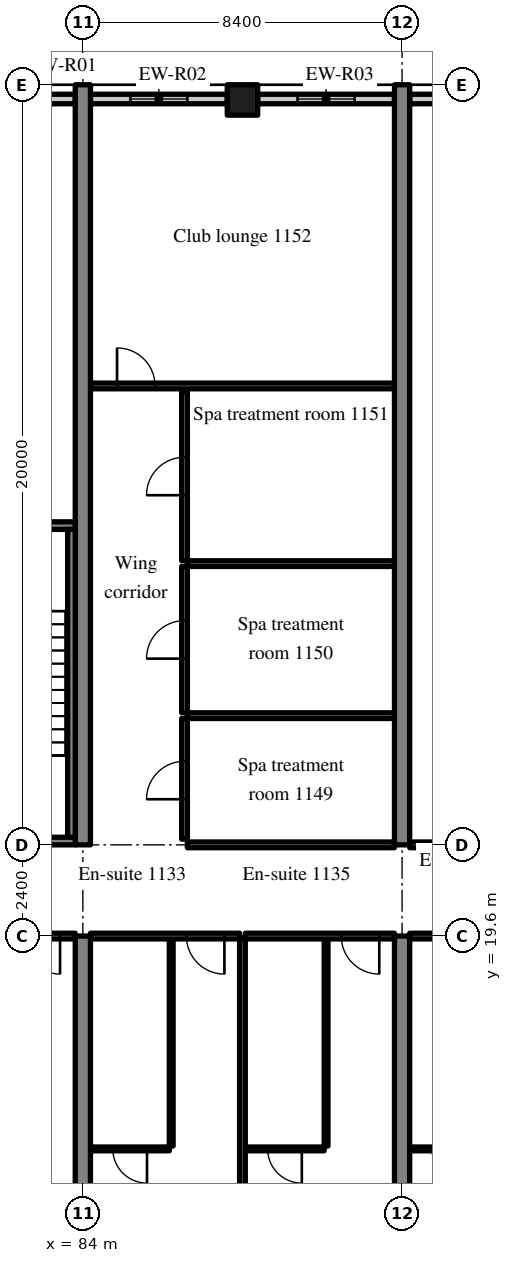
"""IFC4 building model, lengths in metres.
Left out: names, types, materials, properties, quantities, classifications, styles, units other than length and angle.
Written with IfcOpenShell. Run it as: python <this file> out.ifc"""

import sys

from ifc_helpers import new_model, si_unit, direction, frame, frame_2d, origin, origin_2d, place, context, subcontext, project, spatial, rectangle, extrude, source, transform, mapped, element, fill, save


model = new_model("IFC4")
c1 = context("Model", 3, precision=1e-05, world=origin(), true_north=direction((0.0, 1.0)))
c2 = subcontext(c1, "Body", "Model", "MODEL_VIEW")
j1 = project(units=[si_unit("LENGTHUNIT", "METRE"), si_unit("PLANEANGLEUNIT", "RADIAN")], contexts=[c1])
p1 = place(None, origin())
s1 = spatial("IfcSite", under=j1, at=p1, CompositionType="ELEMENT")
p2 = place(p1, origin())
s2 = spatial("IfcBuilding", under=s1, at=p2, CompositionType="ELEMENT")
p3 = place(p2, frame((0.0, 0.0, 50.6)))
s3 = spatial("IfcBuildingStorey", under=s2, at=p3, CompositionType="ELEMENT", Elevation=50.6)
m1 = source(origin(), c2, "Body", "SweptSolid", [
    extrude(rectangle(XDim=19.6, YDim=0.4, at=frame_2d((9.8, 0.0))), origin(), (0.0, 0.0, 1.0), 3.52),
])
p4 = place(p3, frame((84.0, 0.0, 0.0), z_axis=(0.0, 0.0, 1.0), x_axis=(0.0, 1.0, 0.0)))
e1 = element("IfcWall", 1, at=p4, inside=s3, PredefinedType="SHEAR", context=c2, shape_type="MappedRepresentation", body=[
    mapped(m1, transform((0.0, 0.0, 0.0), scale=1.0)),
])
m2 = source(origin(), c2, "Body", "SweptSolid", [
    extrude(rectangle(XDim=20.0, YDim=0.4, at=frame_2d((10.0, 0.0))), origin(), (0.0, 0.0, 1.0), 3.52),
])
p5 = place(p3, frame((84.0, 22.0, 0.0), z_axis=(0.0, 0.0, 1.0), x_axis=(0.0, 1.0, 0.0)))
e2 = element("IfcWall", 2, at=p5, inside=s3, PredefinedType="SHEAR", context=c2, shape_type="MappedRepresentation", body=[
    mapped(m2, transform((0.0, 0.0, 0.0), scale=1.0)),
])
p6 = place(p3, frame((92.4, 0.0, 0.0), z_axis=(0.0, 0.0, 1.0), x_axis=(0.0, 1.0, 0.0)))
e3 = element("IfcWall", 3, at=p6, inside=s3, PredefinedType="SHEAR", context=c2, shape_type="MappedRepresentation", body=[
    mapped(m1, transform((0.0, 0.0, 0.0), scale=1.0)),
])
p7 = place(p3, frame((92.4, 22.0, 0.0), z_axis=(0.0, 0.0, 1.0), x_axis=(0.0, 1.0, 0.0)))
e4 = element("IfcWall", 4, at=p7, inside=s3, PredefinedType="SHEAR", context=c2, shape_type="MappedRepresentation", body=[
    mapped(m2, transform((0.0, 0.0, 0.0), scale=1.0)),
])
m3 = source(origin(), c2, "Body", "SweptSolid", [
    extrude(rectangle(XDim=0.8, YDim=0.8, at=origin_2d()), origin(), (0.0, 0.0, 1.0), 3.52),
])
p8 = place(p3, frame((88.2, 41.6, 0.0), z_axis=(0.0, 0.0, 1.0), x_axis=(1.0, 0.0, 0.0)))
e5 = element("IfcColumn", 5, at=p8, inside=s3, PredefinedType="COLUMN", context=c2, shape_type="MappedRepresentation", body=[
    mapped(m3, transform((0.0, 0.0, 0.0), scale=1.0)),
])
m4 = source(origin(), c2, "Body", "SweptSolid", [
    extrude(rectangle(XDim=1.658, YDim=0.25, at=frame_2d((0.829, 0.0))), origin(), (0.0, 0.0, 1.0), 2.82),
])
p9 = place(p3, frame((83.8, 41.625, 0.0), z_axis=(0.0, 0.0, 1.0), x_axis=(-1.0, 0.0, 0.0)))
e6 = element("IfcWall", 6, at=p9, inside=s3, PredefinedType="SOLIDWALL", context=c2, shape_type="MappedRepresentation", body=[
    mapped(m4, transform((0.0, 0.0, 0.0), scale=1.0)),
])
m5 = source(origin(), c2, "Body", "SweptSolid", [
    extrude(rectangle(XDim=3.6, YDim=0.25, at=frame_2d((1.8, 0.0))), origin(), (0.0, 0.0, 1.0), 2.82),
])
p10 = place(p3, frame((87.8, 41.625, 0.0), z_axis=(0.0, 0.0, 1.0), x_axis=(-1.0, 0.0, 0.0)))
e7 = element("IfcWall", 7, at=p10, inside=s3, PredefinedType="SOLIDWALL", context=c2, shape_type="MappedRepresentation", body=[
    mapped(m5, transform((0.0, 0.0, 0.0), scale=1.0)),
])
m6 = source(origin(), c2, "Body", "SweptSolid", [
    extrude(rectangle(XDim=1.5, YDim=1.5, at=frame_2d((0.75, 0.75))), frame((0.0, 0.135, 0.0), z_axis=(0.0, -1.0, 0.0), x_axis=(1.0, 0.0, 0.0)), (0.0, 0.0, 1.0), 0.27),
])
p11 = place(p10, frame((1.05, 0.0, 0.9)))
e8 = element("IfcOpeningElement", 8, at=p11, cuts=e7, PredefinedType="OPENING", context=c2, shape_type="MappedRepresentation", body=[
    mapped(m6, transform((0.0, 0.0, 0.0), scale=1.0)),
])
m7 = source(origin(), c2, "Body", "SweptSolid", [
    extrude(rectangle(XDim=3.6, YDim=0.25, at=frame_2d((1.8, 0.0))), origin(), (0.0, 0.0, 1.0), 2.82),
])
p12 = place(p3, frame((92.2, 41.625, 0.0), z_axis=(0.0, 0.0, 1.0), x_axis=(-1.0, 0.0, 0.0)))
e9 = element("IfcWall", 9, at=p12, inside=s3, PredefinedType="SOLIDWALL", context=c2, shape_type="MappedRepresentation", body=[
    mapped(m7, transform((0.0, 0.0, 0.0), scale=1.0)),
])
p13 = place(p12, frame((1.05, 0.0, 0.9)))
e10 = element("IfcOpeningElement", 10, at=p13, cuts=e9, PredefinedType="OPENING", context=c2, shape_type="MappedRepresentation", body=[
    mapped(m6, transform((0.0, 0.0, 0.0), scale=1.0)),
])
m8 = source(origin(), c2, "Body", "SweptSolid", [
    extrude(rectangle(XDim=4.045, YDim=0.25, at=frame_2d((2.022, 0.0))), origin(), (0.0, 0.0, 1.0), 2.82),
])
p14 = place(p3, frame((96.645, 41.625, 0.0), z_axis=(0.0, 0.0, 1.0), x_axis=(-1.0, 0.0, 0.0)))
e11 = element("IfcWall", 11, at=p14, inside=s3, PredefinedType="SOLIDWALL", context=c2, shape_type="MappedRepresentation", body=[
    mapped(m8, transform((0.0, 0.0, 0.0), scale=1.0)),
])
p15 = place(p14, frame((1.272, 0.0, 0.9)))
e12 = element("IfcOpeningElement", 12, at=p15, cuts=e11, PredefinedType="OPENING", context=c2, shape_type="MappedRepresentation", body=[
    mapped(m6, transform((0.0, 0.0, 0.0), scale=1.0)),
])
m9 = source(origin(), c2, "Body", "SweptSolid", [
    extrude(rectangle(XDim=8.2, YDim=0.2, at=frame_2d((4.1, 0.0))), origin(), (0.0, 0.0, 1.0), 3.52),
])
p16 = place(p3, frame((83.8, 22.1, 0.0), z_axis=(0.0, 0.0, 1.0), x_axis=(-1.0, 0.0, 0.0)))
e13 = element("IfcWall", 13, at=p16, inside=s3, PredefinedType="SOLIDWALL", context=c2, shape_type="MappedRepresentation", body=[
    mapped(m9, transform((0.0, 0.0, 0.0), scale=1.0)),
])
m10 = source(origin(), c2, "Body", "SweptSolid", [
    extrude(rectangle(XDim=1.2, YDim=2.1, at=frame_2d((0.6, 1.05))), frame((0.0, 0.11, 0.0), z_axis=(0.0, -1.0, 0.0), x_axis=(1.0, 0.0, 0.0)), (0.0, 0.0, 1.0), 0.22),
])
p17 = place(p16, frame((6.0, 0.0, 0.0)))
e14 = element("IfcOpeningElement", 14, at=p17, cuts=e13, PredefinedType="OPENING", context=c2, shape_type="MappedRepresentation", body=[
    mapped(m10, transform((0.0, 0.0, 0.0), scale=1.0)),
])
p18 = place(p3, frame((83.8, 30.4, 0.0), z_axis=(0.0, 0.0, 1.0), x_axis=(-1.0, 0.0, 0.0)))
e15 = element("IfcWall", 15, at=p18, inside=s3, PredefinedType="SOLIDWALL", context=c2, shape_type="MappedRepresentation", body=[
    mapped(m9, transform((0.0, 0.0, 0.0), scale=1.0)),
])
m11 = source(origin(), c2, "Body", "SweptSolid", [
    extrude(rectangle(XDim=1.0, YDim=2.1, at=frame_2d((0.5, 1.05))), frame((0.0, 0.11, 0.0), z_axis=(0.0, -1.0, 0.0), x_axis=(1.0, 0.0, 0.0)), (0.0, 0.0, 1.0), 0.22),
])
p19 = place(p18, frame((6.1, 0.0, 0.0)))
e16 = element("IfcOpeningElement", 16, at=p19, cuts=e15, PredefinedType="OPENING", context=c2, shape_type="MappedRepresentation", body=[
    mapped(m11, transform((0.0, 0.0, 0.0), scale=1.0)),
])
m12 = source(origin(), c2, "Body", "SweptSolid", [
    extrude(rectangle(XDim=8.1, YDim=0.2, at=frame_2d((4.05, 0.0))), origin(), (0.0, 0.0, 1.0), 3.52),
])
p20 = place(p3, frame((83.7, 22.2, 0.0), z_axis=(0.0, 0.0, 1.0), x_axis=(0.0, 1.0, 0.0)))
e17 = element("IfcWall", 17, at=p20, inside=s3, PredefinedType="SOLIDWALL", context=c2, shape_type="MappedRepresentation", body=[
    mapped(m12, transform((0.0, 0.0, 0.0), scale=1.0)),
])
m13 = source(origin(), c2, "Body", "SweptSolid", [
    extrude(rectangle(XDim=3.925, YDim=0.15, at=frame_2d((1.962, 0.0))), origin(), (0.0, 0.0, 1.0), 2.82),
])
p21 = place(p3, frame((79.875, 19.6, 0.0), z_axis=(0.0, 0.0, 1.0), x_axis=(1.0, 0.0, 0.0)))
e18 = element("IfcWall", 18, at=p21, inside=s3, PredefinedType="PARTITIONING", context=c2, shape_type="MappedRepresentation", body=[
    mapped(m13, transform((0.0, 0.0, 0.0), scale=1.0)),
])
m14 = source(origin(), c2, "Body", "SweptSolid", [
    extrude(rectangle(XDim=1.0, YDim=2.1, at=frame_2d((0.5, 1.05))), frame((0.0, 0.085, 0.0), z_axis=(0.0, -1.0, 0.0), x_axis=(1.0, 0.0, 0.0)), (0.0, 0.0, 1.0), 0.17),
])
p22 = place(p21, frame((2.525, 0.0, 0.0)))
e19 = element("IfcOpeningElement", 19, at=p22, cuts=e18, PredefinedType="OPENING", context=c2, shape_type="MappedRepresentation", body=[
    mapped(m14, transform((0.0, 0.0, 0.0), scale=1.0)),
])
m15 = source(origin(), c2, "Body", "SweptSolid", [
    extrude(rectangle(XDim=5.45, YDim=0.1, at=frame_2d((2.725, 0.0))), origin(), (0.0, 0.0, 1.0), 3.52),
])
p23 = place(p3, frame((86.325, 14.075, 0.0), z_axis=(0.0, 0.0, 1.0), x_axis=(0.0, 1.0, 0.0)))
e20 = element("IfcWall", 20, at=p23, inside=s3, PredefinedType="PARTITIONING", context=c2, shape_type="MappedRepresentation", body=[
    mapped(m15, transform((0.0, 0.0, 0.0), scale=1.0)),
])
m16 = source(origin(), c2, "Body", "SweptSolid", [
    extrude(rectangle(XDim=2.075, YDim=0.1, at=frame_2d((1.038, 0.0))), origin(), (0.0, 0.0, 1.0), 3.52),
])
p24 = place(p3, frame((84.2, 14.0, 0.0), z_axis=(0.0, 0.0, 1.0), x_axis=(1.0, 0.0, 0.0)))
e21 = element("IfcWall", 21, at=p24, inside=s3, PredefinedType="PARTITIONING", context=c2, shape_type="MappedRepresentation", body=[
    mapped(m16, transform((0.0, 0.0, 0.0), scale=1.0)),
])
m17 = source(origin(), c2, "Body", "SweptSolid", [
    extrude(rectangle(XDim=0.9, YDim=2.1, at=frame_2d((0.45, 1.05))), frame((0.0, 0.06, 0.0), z_axis=(0.0, -1.0, 0.0), x_axis=(1.0, 0.0, 0.0)), (0.0, 0.0, 1.0), 0.12),
])
p25 = place(p24, frame((0.588, 0.0, 0.0)))
e22 = element("IfcOpeningElement", 22, at=p25, cuts=e21, PredefinedType="OPENING", context=c2, shape_type="MappedRepresentation", body=[
    mapped(m17, transform((0.0, 0.0, 0.0), scale=1.0)),
])
p26 = place(p3, frame((84.2, 19.6, 0.0), z_axis=(0.0, 0.0, 1.0), x_axis=(1.0, 0.0, 0.0)))
e23 = element("IfcWall", 23, at=p26, inside=s3, PredefinedType="PARTITIONING", context=c2, shape_type="MappedRepresentation", body=[
    mapped(m13, transform((0.0, 0.0, 0.0), scale=1.0)),
])
p27 = place(p26, frame((2.525, 0.0, 0.0)))
e24 = element("IfcOpeningElement", 24, at=p27, cuts=e23, PredefinedType="OPENING", context=c2, shape_type="MappedRepresentation", body=[
    mapped(m14, transform((0.0, 0.0, 0.0), scale=1.0)),
])
p28 = place(p3, frame((90.4, 14.075, 0.0), z_axis=(0.0, 0.0, 1.0), x_axis=(0.0, 1.0, 0.0)))
e25 = element("IfcWall", 25, at=p28, inside=s3, PredefinedType="PARTITIONING", context=c2, shape_type="MappedRepresentation", body=[
    mapped(m15, transform((0.0, 0.0, 0.0), scale=1.0)),
])
m18 = source(origin(), c2, "Body", "SweptSolid", [
    extrude(rectangle(XDim=2.075, YDim=0.1, at=frame_2d((1.038, 0.0))), origin(), (0.0, 0.0, 1.0), 3.52),
])
p29 = place(p3, frame((88.275, 14.0, 0.0), z_axis=(0.0, 0.0, 1.0), x_axis=(1.0, 0.0, 0.0)))
e26 = element("IfcWall", 26, at=p29, inside=s3, PredefinedType="PARTITIONING", context=c2, shape_type="MappedRepresentation", body=[
    mapped(m18, transform((0.0, 0.0, 0.0), scale=1.0)),
])
p30 = place(p29, frame((0.587, 0.0, 0.0)))
e27 = element("IfcOpeningElement", 27, at=p30, cuts=e26, PredefinedType="OPENING", context=c2, shape_type="MappedRepresentation", body=[
    mapped(m17, transform((0.0, 0.0, 0.0), scale=1.0)),
])
p31 = place(p3, frame((88.275, 19.6, 0.0), z_axis=(0.0, 0.0, 1.0), x_axis=(1.0, 0.0, 0.0)))
e28 = element("IfcWall", 28, at=p31, inside=s3, PredefinedType="PARTITIONING", context=c2, shape_type="MappedRepresentation", body=[
    mapped(m13, transform((0.0, 0.0, 0.0), scale=1.0)),
])
p32 = place(p31, frame((2.525, 0.0, 0.0)))
e29 = element("IfcOpeningElement", 29, at=p32, cuts=e28, PredefinedType="OPENING", context=c2, shape_type="MappedRepresentation", body=[
    mapped(m14, transform((0.0, 0.0, 0.0), scale=1.0)),
])
m19 = source(origin(), c2, "Body", "SweptSolid", [
    extrude(rectangle(XDim=18.725, YDim=0.15, at=frame_2d((9.362, 0.0))), origin(), (0.0, 0.0, 1.0), 3.52),
])
p33 = place(p3, frame((88.2, 0.8, 0.0), z_axis=(0.0, 0.0, 1.0), x_axis=(0.0, 1.0, 0.0)))
e30 = element("IfcWall", 30, at=p33, inside=s3, PredefinedType="PARTITIONING", context=c2, shape_type="MappedRepresentation", body=[
    mapped(m19, transform((0.0, 0.0, 0.0), scale=1.0)),
])
p34 = place(p3, frame((92.6, 14.0, 0.0), z_axis=(0.0, 0.0, 1.0), x_axis=(1.0, 0.0, 0.0)))
e31 = element("IfcWall", 31, at=p34, inside=s3, PredefinedType="PARTITIONING", context=c2, shape_type="MappedRepresentation", body=[
    mapped(m16, transform((0.0, 0.0, 0.0), scale=1.0)),
])
p35 = place(p34, frame((0.587, 0.0, 0.0)))
e32 = element("IfcOpeningElement", 32, at=p35, cuts=e31, PredefinedType="OPENING", context=c2, shape_type="MappedRepresentation", body=[
    mapped(m17, transform((0.0, 0.0, 0.0), scale=1.0)),
])
m20 = source(origin(), c2, "Body", "SweptSolid", [
    extrude(rectangle(XDim=3.925, YDim=0.15, at=frame_2d((1.962, 0.0))), origin(), (0.0, 0.0, 1.0), 2.82),
])
p36 = place(p3, frame((92.6, 19.6, 0.0), z_axis=(0.0, 0.0, 1.0), x_axis=(1.0, 0.0, 0.0)))
e33 = element("IfcWall", 33, at=p36, inside=s3, PredefinedType="PARTITIONING", context=c2, shape_type="MappedRepresentation", body=[
    mapped(m20, transform((0.0, 0.0, 0.0), scale=1.0)),
])
p37 = place(p36, frame((2.525, 0.0, 0.0)))
e34 = element("IfcOpeningElement", 34, at=p37, cuts=e33, PredefinedType="OPENING", context=c2, shape_type="MappedRepresentation", body=[
    mapped(m14, transform((0.0, 0.0, 0.0), scale=1.0)),
])
m21 = source(origin(), c2, "Body", "SweptSolid", [
    extrude(rectangle(XDim=5.45, YDim=0.15, at=frame_2d((2.725, 0.0))), origin(), (0.0, 0.0, 1.0), 2.82),
])
p38 = place(p3, frame((86.75, 22.0, 0.0), z_axis=(0.0, 0.0, 1.0), x_axis=(1.0, 0.0, 0.0)))
e35 = element("IfcWall", 35, at=p38, inside=s3, PredefinedType="PARTITIONING", context=c2, shape_type="MappedRepresentation", body=[
    mapped(m21, transform((0.0, 0.0, 0.0), scale=1.0)),
])
m22 = source(origin(), c2, "Body", "SweptSolid", [
    extrude(rectangle(XDim=3.175, YDim=0.15, at=frame_2d((1.587, 0.0))), origin(), (0.0, 0.0, 1.0), 3.52),
])
p39 = place(p3, frame((86.675, 22.15, 0.0), z_axis=(0.0, 0.0, 1.0), x_axis=(0.0, 1.0, 0.0)))
e36 = element("IfcWall", 36, at=p39, inside=s3, PredefinedType="PARTITIONING", context=c2, shape_type="MappedRepresentation", body=[
    mapped(m22, transform((0.0, 0.0, 0.0), scale=1.0)),
])
p40 = place(p39, frame((1.05, 0.0, 0.0)))
e37 = element("IfcOpeningElement", 37, at=p40, cuts=e36, PredefinedType="OPENING", context=c2, shape_type="MappedRepresentation", body=[
    mapped(m14, transform((0.0, 0.0, 0.0), scale=1.0)),
])
m23 = source(origin(), c2, "Body", "SweptSolid", [
    extrude(rectangle(XDim=5.45, YDim=0.15, at=frame_2d((2.725, 0.0))), origin(), (0.0, 0.0, 1.0), 3.52),
])
p41 = place(p3, frame((86.75, 25.4, 0.0), z_axis=(0.0, 0.0, 1.0), x_axis=(1.0, 0.0, 0.0)))
e38 = element("IfcWall", 38, at=p41, inside=s3, PredefinedType="PARTITIONING", context=c2, shape_type="MappedRepresentation", body=[
    mapped(m23, transform((0.0, 0.0, 0.0), scale=1.0)),
])
m24 = source(origin(), c2, "Body", "SweptSolid", [
    extrude(rectangle(XDim=3.85, YDim=0.15, at=frame_2d((1.925, 0.0))), origin(), (0.0, 0.0, 1.0), 3.52),
])
p42 = place(p3, frame((86.675, 25.475, 0.0), z_axis=(0.0, 0.0, 1.0), x_axis=(0.0, 1.0, 0.0)))
e39 = element("IfcWall", 39, at=p42, inside=s3, PredefinedType="PARTITIONING", context=c2, shape_type="MappedRepresentation", body=[
    mapped(m24, transform((0.0, 0.0, 0.0), scale=1.0)),
])
p43 = place(p42, frame((1.425, 0.0, 0.0)))
e40 = element("IfcOpeningElement", 40, at=p43, cuts=e39, PredefinedType="OPENING", context=c2, shape_type="MappedRepresentation", body=[
    mapped(m14, transform((0.0, 0.0, 0.0), scale=1.0)),
])
p44 = place(p3, frame((86.75, 29.4, 0.0), z_axis=(0.0, 0.0, 1.0), x_axis=(1.0, 0.0, 0.0)))
e41 = element("IfcWall", 41, at=p44, inside=s3, PredefinedType="PARTITIONING", context=c2, shape_type="MappedRepresentation", body=[
    mapped(m23, transform((0.0, 0.0, 0.0), scale=1.0)),
])
m25 = source(origin(), c2, "Body", "SweptSolid", [
    extrude(rectangle(XDim=4.45, YDim=0.15, at=frame_2d((2.225, 0.0))), origin(), (0.0, 0.0, 1.0), 3.52),
])
p45 = place(p3, frame((86.675, 29.475, 0.0), z_axis=(0.0, 0.0, 1.0), x_axis=(0.0, 1.0, 0.0)))
e42 = element("IfcWall", 42, at=p45, inside=s3, PredefinedType="PARTITIONING", context=c2, shape_type="MappedRepresentation", body=[
    mapped(m25, transform((0.0, 0.0, 0.0), scale=1.0)),
])
p46 = place(p45, frame((1.725, 0.0, 0.0)))
e43 = element("IfcOpeningElement", 43, at=p46, cuts=e42, PredefinedType="OPENING", context=c2, shape_type="MappedRepresentation", body=[
    mapped(m14, transform((0.0, 0.0, 0.0), scale=1.0)),
])
m26 = source(origin(), c2, "Body", "SweptSolid", [
    extrude(rectangle(XDim=8.0, YDim=0.15, at=frame_2d((4.0, 0.0))), origin(), (0.0, 0.0, 1.0), 3.52),
])
p47 = place(p3, frame((84.2, 34.075, 0.0), z_axis=(0.0, 0.0, 1.0), x_axis=(1.0, 0.0, 0.0)))
e44 = element("IfcWall", 44, at=p47, inside=s3, PredefinedType="PARTITIONING", context=c2, shape_type="MappedRepresentation", body=[
    mapped(m26, transform((0.0, 0.0, 0.0), scale=1.0)),
])
p48 = place(p47, frame((0.7, 0.0, 0.0)))
e45 = element("IfcOpeningElement", 45, at=p48, cuts=e44, PredefinedType="OPENING", context=c2, shape_type="MappedRepresentation", body=[
    mapped(m14, transform((0.0, 0.0, 0.0), scale=1.0)),
])
m27 = source(origin(), c2, "Body", "SweptSolid", [
    extrude(rectangle(XDim=7.8, YDim=0.15, at=frame_2d((3.9, 0.0))), origin(), (0.0, 0.0, 1.0), 2.82),
])
p49 = place(p3, frame((92.6, 22.0, 0.0), z_axis=(0.0, 0.0, 1.0), x_axis=(1.0, 0.0, 0.0)))
e46 = element("IfcWall", 46, at=p49, inside=s3, PredefinedType="PARTITIONING", context=c2, shape_type="MappedRepresentation", body=[
    mapped(m27, transform((0.0, 0.0, 0.0), scale=1.0)),
])
m28 = source(origin(), c2, "Body", "SweptSolid", [
    extrude(rectangle(XDim=1.8, YDim=2.1, at=frame_2d((0.9, 1.05))), frame((0.0, 0.085, 0.0), z_axis=(0.0, -1.0, 0.0), x_axis=(1.0, 0.0, 0.0)), (0.0, 0.0, 1.0), 0.17),
])
p50 = place(p49, frame((3.0, 0.0, 0.0)))
e47 = element("IfcOpeningElement", 47, at=p50, cuts=e46, PredefinedType="OPENING", context=c2, shape_type="MappedRepresentation", body=[
    mapped(m28, transform((0.0, 0.0, 0.0), scale=1.0)),
])
m29 = source(origin(), c2, "Body", "SweptSolid", [
    extrude(rectangle(XDim=1.5, YDim=1.5, at=frame_2d((0.75, 0.75))), frame((0.0, 0.03, 0.0), z_axis=(0.0, -1.0, 0.0), x_axis=(1.0, 0.0, 0.0)), (0.0, 0.0, 1.0), 0.06),
])
p51 = place(p11, origin())
e48 = element("IfcWindow", 48, at=p51, inside=s3, PartitioningType="SINGLE_PANEL", PredefinedType="WINDOW", context=c2, shape_type="MappedRepresentation", body=[
    mapped(m29, transform((0.0, 0.0, 0.0), scale=1.0)),
])
fill(e8, e48)
p52 = place(p13, origin())
e49 = element("IfcWindow", 49, at=p52, inside=s3, PartitioningType="SINGLE_PANEL", PredefinedType="WINDOW", context=c2, shape_type="MappedRepresentation", body=[
    mapped(m29, transform((0.0, 0.0, 0.0), scale=1.0)),
])
fill(e10, e49)
m30 = source(origin(), c2, "Body", "SweptSolid", [
    extrude(rectangle(XDim=1.0, YDim=2.1, at=frame_2d((0.5, 1.05))), frame((0.0, 0.025, 0.0), z_axis=(0.0, -1.0, 0.0), x_axis=(1.0, 0.0, 0.0)), (0.0, 0.0, 1.0), 0.05),
])
p53 = place(p22, origin())
e50 = element("IfcDoor", 50, at=p53, inside=s3, OperationType="SINGLE_SWING_RIGHT", PredefinedType="DOOR", context=c2, shape_type="MappedRepresentation", body=[
    mapped(m30, transform((0.0, 0.0, 0.0), scale=1.0)),
])
fill(e19, e50)
m31 = source(origin(), c2, "Body", "SweptSolid", [
    extrude(rectangle(XDim=0.9, YDim=2.1, at=frame_2d((0.45, 1.05))), frame((0.0, 0.025, 0.0), z_axis=(0.0, -1.0, 0.0), x_axis=(1.0, 0.0, 0.0)), (0.0, 0.0, 1.0), 0.05),
])
p54 = place(p25, origin())
e51 = element("IfcDoor", 51, at=p54, inside=s3, OperationType="SINGLE_SWING_RIGHT", PredefinedType="DOOR", context=c2, shape_type="MappedRepresentation", body=[
    mapped(m31, transform((0.0, 0.0, 0.0), scale=1.0)),
])
fill(e22, e51)
p55 = place(p27, origin())
e52 = element("IfcDoor", 52, at=p55, inside=s3, OperationType="SINGLE_SWING_RIGHT", PredefinedType="DOOR", context=c2, shape_type="MappedRepresentation", body=[
    mapped(m30, transform((0.0, 0.0, 0.0), scale=1.0)),
])
fill(e24, e52)
p56 = place(p30, origin())
e53 = element("IfcDoor", 53, at=p56, inside=s3, OperationType="SINGLE_SWING_RIGHT", PredefinedType="DOOR", context=c2, shape_type="MappedRepresentation", body=[
    mapped(m31, transform((0.0, 0.0, 0.0), scale=1.0)),
])
fill(e27, e53)
p57 = place(p32, origin())
e54 = element("IfcDoor", 54, at=p57, inside=s3, OperationType="SINGLE_SWING_RIGHT", PredefinedType="DOOR", context=c2, shape_type="MappedRepresentation", body=[
    mapped(m30, transform((0.0, 0.0, 0.0), scale=1.0)),
])
fill(e29, e54)
p58 = place(p35, origin())
e55 = element("IfcDoor", 55, at=p58, inside=s3, OperationType="SINGLE_SWING_RIGHT", PredefinedType="DOOR", context=c2, shape_type="MappedRepresentation", body=[
    mapped(m31, transform((0.0, 0.0, 0.0), scale=1.0)),
])
fill(e32, e55)
p59 = place(p40, origin())
e56 = element("IfcDoor", 56, at=p59, inside=s3, OperationType="SINGLE_SWING_LEFT", PredefinedType="DOOR", context=c2, shape_type="MappedRepresentation", body=[
    mapped(m30, transform((0.0, 0.0, 0.0), scale=1.0)),
])
fill(e37, e56)
p60 = place(p43, origin())
e57 = element("IfcDoor", 57, at=p60, inside=s3, OperationType="SINGLE_SWING_LEFT", PredefinedType="DOOR", context=c2, shape_type="MappedRepresentation", body=[
    mapped(m30, transform((0.0, 0.0, 0.0), scale=1.0)),
])
fill(e40, e57)
p61 = place(p46, origin())
e58 = element("IfcDoor", 58, at=p61, inside=s3, OperationType="SINGLE_SWING_LEFT", PredefinedType="DOOR", context=c2, shape_type="MappedRepresentation", body=[
    mapped(m30, transform((0.0, 0.0, 0.0), scale=1.0)),
])
fill(e43, e58)
p62 = place(p48, origin())
e59 = element("IfcDoor", 59, at=p62, inside=s3, OperationType="SINGLE_SWING_LEFT", PredefinedType="DOOR", context=c2, shape_type="MappedRepresentation", body=[
    mapped(m30, transform((0.0, 0.0, 0.0), scale=1.0)),
])
fill(e45, e59)
save(model, sys.argv[1])
